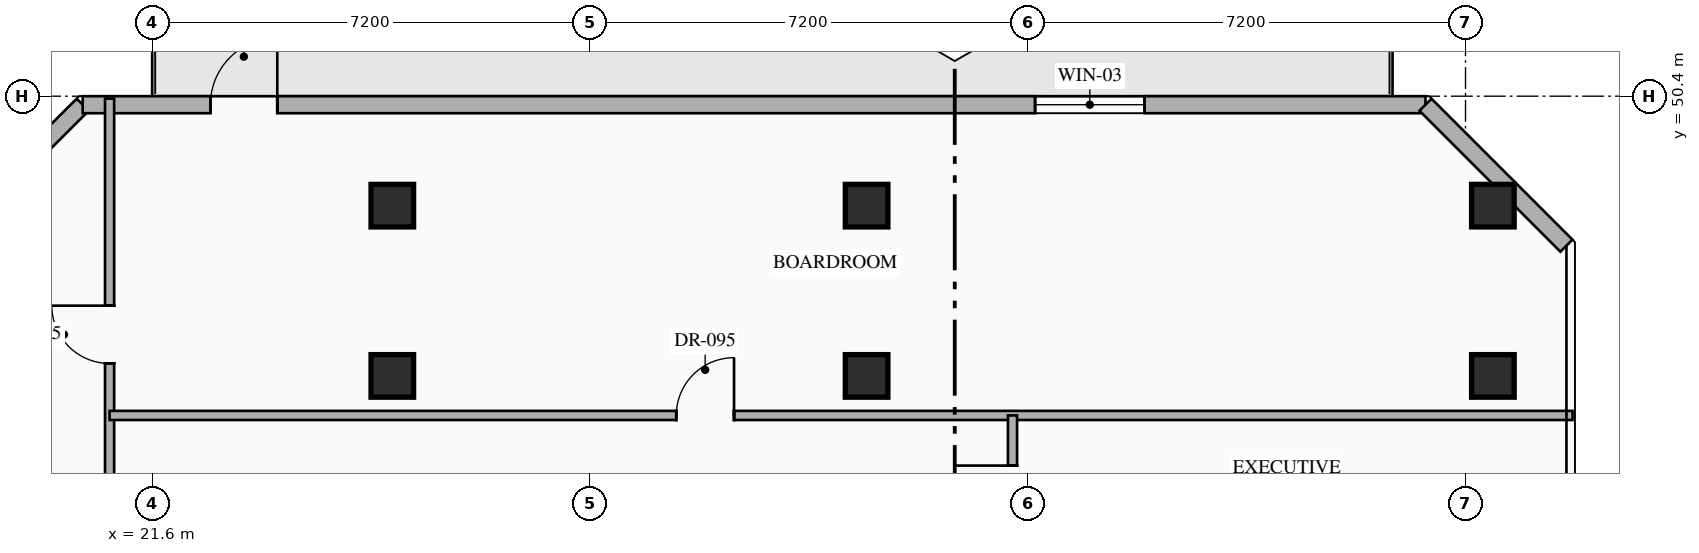
"""IFC4 building model, lengths in metres.
Left out: names, types, materials, properties, quantities, classifications, styles, units other than length and angle.
Written with IfcOpenShell. Run it as: python <this file> out.ifc"""

import sys

from ifc_helpers import new_model, si_unit, direction, frame, frame_2d, origin, origin_2d, place, context, subcontext, project, spatial, rectangle, hollow_rectangle, extrude, element, fill, save


model = new_model("IFC4")
c1 = context("Model", 3, precision=1e-05, world=origin(), true_north=direction((0.0, 1.0)))
c2 = subcontext(c1, "Body", "Model", "MODEL_VIEW")
j1 = project(units=[si_unit("LENGTHUNIT", "METRE"), si_unit("PLANEANGLEUNIT", "RADIAN")], contexts=[c1])
p1 = place(None, origin())
s1 = spatial("IfcSite", under=j1, at=p1, CompositionType="ELEMENT")
p2 = place(p1, origin())
s2 = spatial("IfcBuilding", under=s1, at=p2, CompositionType="ELEMENT")
p3 = place(p2, frame((0.0, 0.0, 227.55)))
s3 = spatial("IfcBuildingStorey", under=s2, at=p3, CompositionType="ELEMENT", Elevation=227.55)
for number, where, z_axis, x_axis in (
    (1, (25.55, 45.8, 0.0), (0.0, 0.0, 1.0), (1.0, 0.0, 0.0)),
    (2, (33.35, 45.8, 0.0), (0.0, 0.0, 1.0), (1.0, 0.0, 0.0)),
    (3, (43.65, 45.8, 0.0), (0.0, 0.0, 1.0), (1.0, 0.0, 0.0)),
    (4, (25.55, 48.6, 0.0), (0.0, 0.0, 1.0), (1.0, 0.0, 0.0)),
    (5, (33.35, 48.6, 0.0), (0.0, 0.0, 1.0), (1.0, 0.0, 0.0)),
    (6, (43.65, 48.6, 0.0), (0.0, 0.0, 1.0), (1.0, 0.0, 0.0)),
):
    element("IfcColumn", number, at=place(p3, frame(where, z_axis=z_axis, x_axis=x_axis)), inside=s3, PredefinedType="COLUMN", context=c2, shape_type="SweptSolid", body=[
        extrude(hollow_rectangle(XDim=0.7, YDim=0.7, WallThickness=0.028, at=origin_2d()), origin(), (0.0, 0.0, 1.0), 3.6),
    ])
p4 = place(p3, frame((18.14, 47.942, 0.0), z_axis=(0.0, 0.0, 1.0), x_axis=(0.707106781187, 0.707106781187, 0.0)))
e7 = element("IfcWall", 7, at=p4, inside=s3, PredefinedType="STANDARD", context=c2, shape_type="SweptSolid", body=[
    extrude(rectangle(XDim=3.278, YDim=0.28, at=frame_2d((1.639, 0.0))), origin(), (0.0, 0.0, 1.0), 3.35),
])
p5 = place(p3, frame((20.458, 50.26, 0.0), z_axis=(0.0, 0.0, 1.0), x_axis=(1.0, 0.0, 0.0)))
e8 = element("IfcWall", 8, at=p5, inside=s3, PredefinedType="STANDARD", context=c2, shape_type="SweptSolid", body=[
    extrude(rectangle(XDim=22.084, YDim=0.28, at=frame_2d((11.042, 0.0))), origin(), (0.0, 0.0, 1.0), 3.35),
])
p6 = place(p5, frame((2.1, 0.0, 0.0)))
e9 = element("IfcOpeningElement", 9, at=p6, cuts=e8, PredefinedType="OPENING", context=c2, shape_type="SweptSolid", body=[
    extrude(rectangle(XDim=1.1, YDim=2.2, at=frame_2d((0.55, 1.1))), frame((0.0, 0.15, 0.0), z_axis=(0.0, -1.0, 0.0), x_axis=(1.0, 0.0, 0.0)), (0.0, 0.0, 1.0), 0.3),
])
p7 = place(p5, frame((15.663, 0.0, 0.85)))
e10 = element("IfcOpeningElement", 10, at=p7, cuts=e8, PredefinedType="OPENING", context=c2, shape_type="SweptSolid", body=[
    extrude(rectangle(XDim=1.8, YDim=2.1, at=frame_2d((0.9, 1.05))), frame((0.0, 0.15, 0.0), z_axis=(0.0, -1.0, 0.0), x_axis=(1.0, 0.0, 0.0)), (0.0, 0.0, 1.0), 0.3),
])
p8 = place(p3, frame((42.542, 50.26, 0.0), z_axis=(0.0, 0.0, 1.0), x_axis=(0.707106781187, -0.707106781187, 0.0)))
e11 = element("IfcWall", 11, at=p8, inside=s3, PredefinedType="STANDARD", context=c2, shape_type="SweptSolid", body=[
    extrude(rectangle(XDim=3.278, YDim=0.28, at=frame_2d((1.639, 0.0))), origin(), (0.0, 0.0, 1.0), 3.35),
])
p9 = place(p3, frame((20.9, 42.6, 0.0), z_axis=(0.0, 0.0, 1.0), x_axis=(0.0, 1.0, 0.0)))
e12 = element("IfcWall", 12, at=p9, inside=s3, PredefinedType="PARTITIONING", context=c2, shape_type="SweptSolid", body=[
    extrude(rectangle(XDim=7.76, YDim=0.15, at=frame_2d((3.88, 0.0))), origin(), (0.0, 0.0, 1.0), 3.35),
])
p10 = place(p9, frame((3.405, 0.0, 0.0)))
e13 = element("IfcOpeningElement", 13, at=p10, cuts=e12, PredefinedType="OPENING", context=c2, shape_type="SweptSolid", body=[
    extrude(rectangle(XDim=0.95, YDim=2.15, at=frame_2d((0.475, 1.075))), frame((0.0, 0.085, 0.0), z_axis=(0.0, -1.0, 0.0), x_axis=(1.0, 0.0, 0.0)), (0.0, 0.0, 1.0), 0.17),
])
p11 = place(p3, frame((20.9, 45.15, 0.0), z_axis=(0.0, 0.0, 1.0), x_axis=(1.0, 0.0, 0.0)))
e14 = element("IfcWall", 14, at=p11, inside=s3, PredefinedType="PARTITIONING", context=c2, shape_type="SweptSolid", body=[
    extrude(rectangle(XDim=24.06, YDim=0.15, at=frame_2d((12.03, 0.0))), origin(), (0.0, 0.0, 1.0), 3.35),
])
p12 = place(p11, frame((9.32, 0.0, 0.0)))
e15 = element("IfcOpeningElement", 15, at=p12, cuts=e14, PredefinedType="OPENING", context=c2, shape_type="SweptSolid", body=[
    extrude(rectangle(XDim=0.95, YDim=2.15, at=frame_2d((0.475, 1.075))), frame((0.0, 0.085, 0.0), z_axis=(0.0, -1.0, 0.0), x_axis=(1.0, 0.0, 0.0)), (0.0, 0.0, 1.0), 0.17),
])
p13 = place(p3, frame((35.75, 42.55, 0.0), z_axis=(0.0, 0.0, 1.0), x_axis=(0.0, 1.0, 0.0)))
e16 = element("IfcWall", 16, at=p13, inside=s3, PredefinedType="PARTITIONING", context=c2, shape_type="SweptSolid", body=[
    extrude(rectangle(XDim=2.6, YDim=0.15, at=frame_2d((1.3, 0.0))), origin(), (0.0, 0.0, 1.0), 3.35),
])
p14 = place(p13, frame((0.825, 0.0, 0.0)))
e17 = element("IfcOpeningElement", 17, at=p14, cuts=e16, PredefinedType="OPENING", context=c2, shape_type="SweptSolid", body=[
    extrude(rectangle(XDim=0.95, YDim=2.15, at=frame_2d((0.475, 1.075))), frame((0.0, 0.085, 0.0), z_axis=(0.0, -1.0, 0.0), x_axis=(1.0, 0.0, 0.0)), (0.0, 0.0, 1.0), 0.17),
])
p15 = place(p6, origin())
e18 = element("IfcDoor", 18, at=p15, inside=s3, OperationType="SINGLE_SWING_RIGHT", PredefinedType="DOOR", context=c2, shape_type="SweptSolid", body=[
    extrude(rectangle(XDim=1.1, YDim=2.2, at=frame_2d((0.55, 1.1))), frame((0.0, 0.025, 0.0), z_axis=(0.0, -1.0, 0.0), x_axis=(1.0, 0.0, 0.0)), (0.0, 0.0, 1.0), 0.05),
])
fill(e9, e18)
p16 = place(p7, origin())
e19 = element("IfcWindow", 19, at=p16, inside=s3, PartitioningType="SINGLE_PANEL", PredefinedType="WINDOW", context=c2, shape_type="SweptSolid", body=[
    extrude(rectangle(XDim=1.8, YDim=2.1, at=frame_2d((0.9, 1.05))), frame((0.0, 0.03, 0.0), z_axis=(0.0, -1.0, 0.0), x_axis=(1.0, 0.0, 0.0)), (0.0, 0.0, 1.0), 0.06),
])
fill(e10, e19)
p17 = place(p10, origin())
e20 = element("IfcDoor", 20, at=p17, inside=s3, OperationType="SINGLE_SWING_RIGHT", PredefinedType="DOOR", context=c2, shape_type="SweptSolid", body=[
    extrude(rectangle(XDim=0.95, YDim=2.15, at=frame_2d((0.475, 1.075))), frame((0.0, 0.025, 0.0), z_axis=(0.0, -1.0, 0.0), x_axis=(1.0, 0.0, 0.0)), (0.0, 0.0, 1.0), 0.05),
])
fill(e13, e20)
p18 = place(p12, origin())
e21 = element("IfcDoor", 21, at=p18, inside=s3, OperationType="SINGLE_SWING_RIGHT", PredefinedType="DOOR", context=c2, shape_type="SweptSolid", body=[
    extrude(rectangle(XDim=0.95, YDim=2.15, at=frame_2d((0.475, 1.075))), frame((0.0, 0.025, 0.0), z_axis=(0.0, -1.0, 0.0), x_axis=(1.0, 0.0, 0.0)), (0.0, 0.0, 1.0), 0.05),
])
fill(e15, e21)
p19 = place(p14, origin())
e22 = element("IfcDoor", 22, at=p19, inside=s3, OperationType="SINGLE_SWING_RIGHT", PredefinedType="DOOR", context=c2, shape_type="SweptSolid", body=[
    extrude(rectangle(XDim=0.95, YDim=2.15, at=frame_2d((0.475, 1.075))), frame((0.0, 0.025, 0.0), z_axis=(0.0, -1.0, 0.0), x_axis=(1.0, 0.0, 0.0)), (0.0, 0.0, 1.0), 0.05),
])
fill(e17, e22)
save(model, sys.argv[1])
